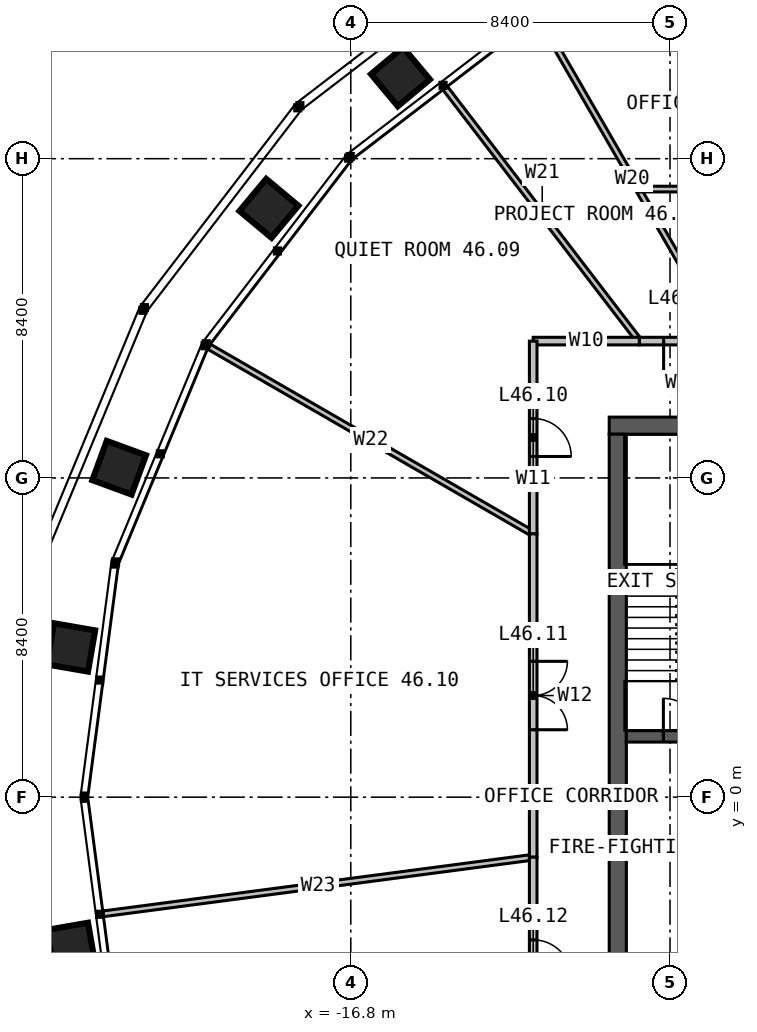
"""IFC4 building model, lengths in metres.
Left out: names, types, materials, properties, quantities, classifications, styles, units other than length and angle.
Written with IfcOpenShell. Run it as: python <this file> out.ifc"""

import sys

from ifc_helpers import new_model, si_unit, direction, frame, frame_2d, origin, place, context, subcontext, project, spatial, rectangle, extrude, element, fill, save


model = new_model("IFC4")
c1 = context("Model", 3, precision=1e-05, world=origin(), true_north=direction((0.0, 1.0)))
c2 = subcontext(c1, "Body", "Model", "MODEL_VIEW")
j1 = project(units=[si_unit("LENGTHUNIT", "METRE"), si_unit("PLANEANGLEUNIT", "RADIAN")], contexts=[c1])
p1 = place(None, origin())
s1 = spatial("IfcSite", under=j1, at=p1, CompositionType="ELEMENT")
p2 = place(p1, origin())
s2 = spatial("IfcBuilding", under=s1, at=p2, CompositionType="ELEMENT")
p3 = place(p2, frame((0.0, 0.0, 191.0)))
s3 = spatial("IfcBuildingStorey", under=s2, at=p3, CompositionType="ELEMENT", Elevation=191.0)
p4 = place(p3, frame((-10.0, 9.775, 0.0), z_axis=(0.0, 0.0, 1.0), x_axis=(1.0, 0.0, 0.0)))
e1 = element("IfcWall", 1, at=p4, inside=s3, PredefinedType="SOLIDWALL", context=c2, shape_type="SweptSolid", body=[
    extrude(rectangle(XDim=20.0, YDim=0.45, at=frame_2d((10.0, 0.0))), origin(), (0.0, 0.0, 1.0), 4.0),
])
p5 = place(p4, frame((9.4, 0.0, 0.0)))
e2 = element("IfcOpeningElement", 2, at=p5, cuts=e1, PredefinedType="OPENING", context=c2, shape_type="SweptSolid", body=[
    extrude(rectangle(XDim=1.2, YDim=2.2, at=frame_2d((0.6, 1.1))), frame((0.0, 0.235, 0.0), z_axis=(0.0, -1.0, 0.0), x_axis=(1.0, 0.0, 0.0)), (0.0, 0.0, 1.0), 0.47),
])
p6 = place(p3, frame((-9.775, 9.55, 0.0), z_axis=(0.0, 0.0, 1.0), x_axis=(0.0, -1.0, 0.0)))
e3 = element("IfcWall", 3, at=p6, inside=s3, PredefinedType="SOLIDWALL", context=c2, shape_type="SweptSolid", body=[
    extrude(rectangle(XDim=19.1, YDim=0.45, at=frame_2d((9.55, 0.0))), origin(), (0.0, 0.0, 1.0), 4.0),
])
p7 = place(p3, frame((-9.55, 1.6, 0.0), z_axis=(0.0, 0.0, 1.0), x_axis=(1.0, 0.0, 0.0)))
e4 = element("IfcWall", 4, at=p7, inside=s3, PredefinedType="SOLIDWALL", context=c2, shape_type="SweptSolid", body=[
    extrude(rectangle(XDim=2.95, YDim=0.3, at=frame_2d((1.475, 0.0))), origin(), (0.0, 0.0, 1.0), 4.0),
])
p8 = place(p7, frame((0.975, 0.0, 0.0)))
e5 = element("IfcOpeningElement", 5, at=p8, cuts=e4, PredefinedType="OPENING", context=c2, shape_type="SweptSolid", body=[
    extrude(rectangle(XDim=1.0, YDim=2.2, at=frame_2d((0.5, 1.1))), frame((0.0, 0.16, 0.0), z_axis=(0.0, -1.0, 0.0), x_axis=(1.0, 0.0, 0.0)), (0.0, 0.0, 1.0), 0.32),
])
p9 = place(p3, frame((-6.928, 12.0, 0.0), z_axis=(0.0, 0.0, 1.0), x_axis=(-0.49999595416, 0.866027739639, 0.0)))
e6 = element("IfcWall", 6, at=p9, inside=s3, PredefinedType="PARTITIONING", context=c2, shape_type="SweptSolid", body=[
    extrude(rectangle(XDim=9.865, YDim=0.15, at=frame_2d((4.932, 0.0))), origin(), (0.0, 0.0, 1.0), 2.79),
])
p10 = place(p3, frame((-9.208, 12.0, 0.0), z_axis=(0.0, 0.0, 1.0), x_axis=(-0.608769821811, 0.793346900197, 0.0)))
e7 = element("IfcWall", 7, at=p10, inside=s3, PredefinedType="PARTITIONING", context=c2, shape_type="SweptSolid", body=[
    extrude(rectangle(XDim=8.393, YDim=0.15, at=frame_2d((4.196, 0.0))), origin(), (0.0, 0.0, 1.0), 2.79),
])
p11 = place(p3, frame((-12.0, 6.928, 0.0), z_axis=(0.0, 0.0, 1.0), x_axis=(-0.866027739639, 0.49999595416, 0.0)))
e8 = element("IfcWall", 8, at=p11, inside=s3, PredefinedType="PARTITIONING", context=c2, shape_type="SweptSolid", body=[
    extrude(rectangle(XDim=9.865, YDim=0.15, at=frame_2d((4.932, 0.0))), origin(), (0.0, 0.0, 1.0), 2.79),
])
p12 = place(p3, frame((-12.0, -1.58, 0.0), z_axis=(0.0, 0.0, 1.0), x_axis=(-0.991444173628, -0.130531416064, 0.0)))
e9 = element("IfcWall", 9, at=p12, inside=s3, PredefinedType="PARTITIONING", context=c2, shape_type="SweptSolid", body=[
    extrude(rectangle(XDim=11.415, YDim=0.15, at=frame_2d((5.708, 0.0))), origin(), (0.0, 0.0, 1.0), 2.79),
])
p13 = place(p3, frame((9.238, 16.0, 0.0), z_axis=(0.0, 0.0, 1.0), x_axis=(-1.0, 0.0, 0.0)))
e10 = element("IfcWall", 10, at=p13, inside=s3, PredefinedType="PARTITIONING", context=c2, shape_type="SweptSolid", body=[
    extrude(rectangle(XDim=18.475, YDim=0.15, at=frame_2d((9.238, 0.0))), origin(), (0.0, 0.0, 1.0), 2.79),
])
p14 = place(p13, frame((3.066, 0.0, 0.0)))
e11 = element("IfcOpeningElement", 11, at=p14, cuts=e10, PredefinedType="OPENING", context=c2, shape_type="SweptSolid", body=[
    extrude(rectangle(XDim=1.0, YDim=2.2, at=frame_2d((0.5, 1.1))), frame((0.0, 0.085, 0.0), z_axis=(0.0, -1.0, 0.0), x_axis=(1.0, 0.0, 0.0)), (0.0, 0.0, 1.0), 0.17),
])
p15 = place(p13, frame((7.684, 0.0, 0.0)))
e12 = element("IfcOpeningElement", 12, at=p15, cuts=e10, PredefinedType="OPENING", context=c2, shape_type="SweptSolid", body=[
    extrude(rectangle(XDim=1.0, YDim=2.2, at=frame_2d((0.5, 1.1))), frame((0.0, 0.085, 0.0), z_axis=(0.0, -1.0, 0.0), x_axis=(1.0, 0.0, 0.0)), (0.0, 0.0, 1.0), 0.17),
])
p16 = place(p13, frame((10.881, 0.0, 0.0)))
e13 = element("IfcOpeningElement", 13, at=p16, cuts=e10, PredefinedType="OPENING", context=c2, shape_type="SweptSolid", body=[
    extrude(rectangle(XDim=1.0, YDim=2.2, at=frame_2d((0.5, 1.1))), frame((0.0, 0.085, 0.0), z_axis=(0.0, -1.0, 0.0), x_axis=(1.0, 0.0, 0.0)), (0.0, 0.0, 1.0), 0.17),
])
p17 = place(p13, frame((15.5, 0.0, 0.0)))
e14 = element("IfcOpeningElement", 14, at=p17, cuts=e10, PredefinedType="OPENING", context=c2, shape_type="SweptSolid", body=[
    extrude(rectangle(XDim=1.0, YDim=2.2, at=frame_2d((0.5, 1.1))), frame((0.0, 0.085, 0.0), z_axis=(0.0, -1.0, 0.0), x_axis=(1.0, 0.0, 0.0)), (0.0, 0.0, 1.0), 0.17),
])
p18 = place(p3, frame((-6.928, 12.0, 0.0), z_axis=(0.0, 0.0, 1.0), x_axis=(-1.0, 0.0, 0.0)))
e15 = element("IfcWall", 15, at=p18, inside=s3, PredefinedType="PARTITIONING", context=c2, shape_type="SweptSolid", body=[
    extrude(rectangle(XDim=2.28, YDim=0.2, at=frame_2d((1.14, 0.0))), origin(), (0.0, 0.0, 1.0), 3.8),
])
p19 = place(p18, frame((0.64, 0.0, 0.0)))
e16 = element("IfcOpeningElement", 16, at=p19, cuts=e15, PredefinedType="OPENING", context=c2, shape_type="SweptSolid", body=[
    extrude(rectangle(XDim=1.0, YDim=2.2, at=frame_2d((0.5, 1.1))), frame((0.0, 0.11, 0.0), z_axis=(0.0, -1.0, 0.0), x_axis=(1.0, 0.0, 0.0)), (0.0, 0.0, 1.0), 0.22),
])
p20 = place(p3, frame((-9.208, 12.0, 0.0), z_axis=(0.0, 0.0, 1.0), x_axis=(-1.0, 0.0, 0.0)))
e17 = element("IfcWall", 17, at=p20, inside=s3, PredefinedType="PARTITIONING", context=c2, shape_type="SweptSolid", body=[
    extrude(rectangle(XDim=2.792, YDim=0.2, at=frame_2d((1.396, 0.0))), origin(), (0.0, 0.0, 1.0), 3.8),
])
p21 = place(p3, frame((-12.0, 12.0, 0.0), z_axis=(0.0, 0.0, 1.0), x_axis=(0.0, -1.0, 0.0)))
e18 = element("IfcWall", 18, at=p21, inside=s3, PredefinedType="PARTITIONING", context=c2, shape_type="SweptSolid", body=[
    extrude(rectangle(XDim=5.072, YDim=0.2, at=frame_2d((2.536, 0.0))), origin(), (0.0, 0.0, 1.0), 3.8),
])
p22 = place(p21, frame((2.036, 0.0, 0.0)))
e19 = element("IfcOpeningElement", 19, at=p22, cuts=e18, PredefinedType="OPENING", context=c2, shape_type="SweptSolid", body=[
    extrude(rectangle(XDim=1.0, YDim=2.2, at=frame_2d((0.5, 1.1))), frame((0.0, 0.11, 0.0), z_axis=(0.0, -1.0, 0.0), x_axis=(1.0, 0.0, 0.0)), (0.0, 0.0, 1.0), 0.22),
])
p23 = place(p3, frame((-12.0, 6.928, 0.0), z_axis=(0.0, 0.0, 1.0), x_axis=(0.0, -1.0, 0.0)))
e20 = element("IfcWall", 20, at=p23, inside=s3, PredefinedType="PARTITIONING", context=c2, shape_type="SweptSolid", body=[
    extrude(rectangle(XDim=8.508, YDim=0.2, at=frame_2d((4.254, 0.0))), origin(), (0.0, 0.0, 1.0), 3.8),
])
p24 = place(p23, frame((3.354, 0.0, 0.0)))
e21 = element("IfcOpeningElement", 21, at=p24, cuts=e20, PredefinedType="OPENING", context=c2, shape_type="SweptSolid", body=[
    extrude(rectangle(XDim=1.8, YDim=2.2, at=frame_2d((0.9, 1.1))), frame((0.0, 0.11, 0.0), z_axis=(0.0, -1.0, 0.0), x_axis=(1.0, 0.0, 0.0)), (0.0, 0.0, 1.0), 0.22),
])
p25 = place(p3, frame((-12.0, -1.58, 0.0), z_axis=(0.0, 0.0, 1.0), x_axis=(0.0, -1.0, 0.0)))
e22 = element("IfcWall", 22, at=p25, inside=s3, PredefinedType="PARTITIONING", context=c2, shape_type="SweptSolid", body=[
    extrude(rectangle(XDim=5.348, YDim=0.2, at=frame_2d((2.674, 0.0))), origin(), (0.0, 0.0, 1.0), 3.8),
])
p26 = place(p25, frame((2.174, 0.0, 0.0)))
e23 = element("IfcOpeningElement", 23, at=p26, cuts=e22, PredefinedType="OPENING", context=c2, shape_type="SweptSolid", body=[
    extrude(rectangle(XDim=1.0, YDim=2.2, at=frame_2d((0.5, 1.1))), frame((0.0, 0.11, 0.0), z_axis=(0.0, -1.0, 0.0), x_axis=(1.0, 0.0, 0.0)), (0.0, 0.0, 1.0), 0.22),
])
p27 = place(p8, origin())
e24 = element("IfcDoor", 24, at=p27, inside=s3, OperationType="SINGLE_SWING_LEFT", PredefinedType="DOOR", context=c2, shape_type="SweptSolid", body=[
    extrude(rectangle(XDim=1.0, YDim=2.2, at=frame_2d((0.5, 1.1))), frame((0.0, 0.025, 0.0), z_axis=(0.0, -1.0, 0.0), x_axis=(1.0, 0.0, 0.0)), (0.0, 0.0, 1.0), 0.05),
])
fill(e5, e24)
p28 = place(p19, origin())
e25 = element("IfcDoor", 25, at=p28, inside=s3, OperationType="SINGLE_SWING_RIGHT", PredefinedType="DOOR", context=c2, shape_type="SweptSolid", body=[
    extrude(rectangle(XDim=1.0, YDim=2.2, at=frame_2d((0.5, 1.1))), frame((0.0, 0.025, 0.0), z_axis=(0.0, -1.0, 0.0), x_axis=(1.0, 0.0, 0.0)), (0.0, 0.0, 1.0), 0.05),
])
fill(e16, e25)
p29 = place(p22, origin())
e26 = element("IfcDoor", 26, at=p29, inside=s3, OperationType="SINGLE_SWING_RIGHT", PredefinedType="DOOR", context=c2, shape_type="SweptSolid", body=[
    extrude(rectangle(XDim=1.0, YDim=2.2, at=frame_2d((0.5, 1.1))), frame((0.0, 0.025, 0.0), z_axis=(0.0, -1.0, 0.0), x_axis=(1.0, 0.0, 0.0)), (0.0, 0.0, 1.0), 0.05),
])
fill(e19, e26)
p30 = place(p24, origin())
e27 = element("IfcDoor", 27, at=p30, inside=s3, OperationType="DOUBLE_DOOR_SINGLE_SWING", PredefinedType="DOOR", context=c2, shape_type="SweptSolid", body=[
    extrude(rectangle(XDim=1.8, YDim=2.2, at=frame_2d((0.9, 1.1))), frame((0.0, 0.025, 0.0), z_axis=(0.0, -1.0, 0.0), x_axis=(1.0, 0.0, 0.0)), (0.0, 0.0, 1.0), 0.05),
])
fill(e21, e27)
p31 = place(p26, origin())
e28 = element("IfcDoor", 28, at=p31, inside=s3, OperationType="SINGLE_SWING_RIGHT", PredefinedType="DOOR", context=c2, shape_type="SweptSolid", body=[
    extrude(rectangle(XDim=1.0, YDim=2.2, at=frame_2d((0.5, 1.1))), frame((0.0, 0.025, 0.0), z_axis=(0.0, -1.0, 0.0), x_axis=(1.0, 0.0, 0.0)), (0.0, 0.0, 1.0), 0.05),
])
fill(e23, e28)
save(model, sys.argv[1])
